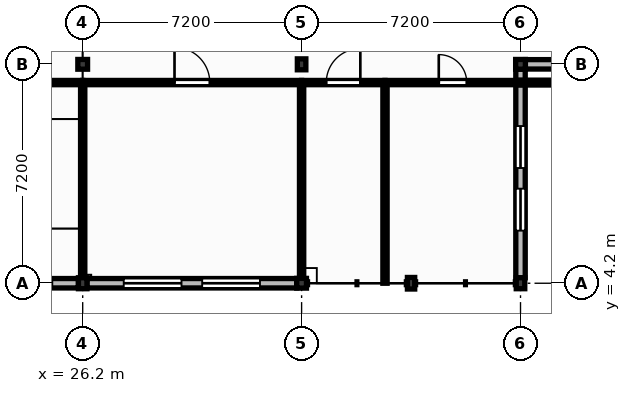
"""IFC4 building model, lengths in metres.
Left out: names, types, materials, properties, quantities, classifications, styles, units other than length and angle.
Written with IfcOpenShell. Run it as: python <this file> out.ifc"""

import sys

from ifc_helpers import new_model, si_unit, direction, frame, frame_2d, origin, origin_2d, place, context, subcontext, project, spatial, rectangle, extrude, element, fill, save


model = new_model("IFC4")
c1 = context("Model", 3, precision=1e-05, world=origin(), true_north=direction((0.0, 1.0)))
c2 = subcontext(c1, "Body", "Model", "MODEL_VIEW")
j1 = project(units=[si_unit("LENGTHUNIT", "METRE"), si_unit("PLANEANGLEUNIT", "RADIAN")], contexts=[c1])
p1 = place(None, origin())
s1 = spatial("IfcSite", under=j1, at=p1, CompositionType="ELEMENT")
p2 = place(p1, origin())
s2 = spatial("IfcBuilding", under=s1, at=p2, CompositionType="ELEMENT")
p3 = place(p2, frame((0.0, 0.0, 9.0)))
s3 = spatial("IfcBuildingStorey", under=s2, at=p3, CompositionType="ELEMENT", Elevation=9.0)
p4 = place(p3, frame((26.2, 4.2, 0.0), z_axis=(0.0, 0.0, 1.0), x_axis=(1.0, 0.0, 0.0)))
e1 = element("IfcColumn", 1, at=p4, inside=s3, PredefinedType="COLUMN", context=c2, shape_type="SweptSolid", body=[
    extrude(rectangle(XDim=0.28, YDim=0.36, at=origin_2d()), origin(), (0.0, 0.0, 1.0), 3.95),
])
for number, where, z_axis, x_axis in (
    (2, (26.2, 11.4, 0.0), (0.0, 0.0, 1.0), (1.0, 0.0, 0.0)),
    (3, (33.4, 4.2, 0.0), (0.0, 0.0, 1.0), (1.0, 0.0, 0.0)),
):
    element("IfcColumn", number, at=place(p3, frame(where, z_axis=z_axis, x_axis=x_axis)), inside=s3, PredefinedType="COLUMN", context=c2, shape_type="SweptSolid", body=[
        extrude(rectangle(XDim=0.32, YDim=0.32, at=origin_2d()), origin(), (0.0, 0.0, 1.0), 3.95),
    ])
for number, where, z_axis, x_axis in (
    (4, (33.4, 11.4, 0.0), (0.0, 0.0, 1.0), (1.0, 0.0, 0.0)),
    (5, (40.6, 4.2, 0.0), (0.0, 0.0, 1.0), (1.0, 0.0, 0.0)),
):
    element("IfcColumn", number, at=place(p3, frame(where, z_axis=z_axis, x_axis=x_axis)), inside=s3, PredefinedType="COLUMN", context=c2, shape_type="SweptSolid", body=[
        extrude(rectangle(XDim=0.28, YDim=0.36, at=origin_2d()), origin(), (0.0, 0.0, 1.0), 3.95),
    ])
p5 = place(p3, frame((40.6, 11.4, 0.0), z_axis=(0.0, 0.0, 1.0), x_axis=(1.0, 0.0, 0.0)))
e6 = element("IfcColumn", 6, at=p5, inside=s3, PredefinedType="COLUMN", context=c2, shape_type="SweptSolid", body=[
    extrude(rectangle(XDim=0.32, YDim=0.32, at=origin_2d()), origin(), (0.0, 0.0, 1.0), 3.95),
])
p6 = place(p3, frame((37.0, 4.2, 0.0), z_axis=(0.0, 0.0, 1.0), x_axis=(1.0, 0.0, 0.0)))
e7 = element("IfcColumn", 7, at=p6, inside=s3, PredefinedType="PILASTER", context=c2, shape_type="SweptSolid", body=[
    extrude(rectangle(XDim=0.24, YDim=0.38, at=origin_2d()), origin(), (0.0, 0.0, 1.0), 3.95),
])
p7 = place(p3, frame((22.72, 4.2, 0.0), z_axis=(0.0, 0.0, 1.0), x_axis=(1.0, 0.0, 0.0)))
e8 = element("IfcWall", 8, at=p7, inside=s3, PredefinedType="SOLIDWALL", context=c2, shape_type="SweptSolid", body=[
    extrude(rectangle(XDim=3.34, YDim=0.31, at=frame_2d((1.67, 0.0))), origin(), (0.0, 0.0, 1.0), 3.49),
])
p8 = place(p7, frame((0.86, 0.0, 1.0)))
e9 = element("IfcOpeningElement", 9, at=p8, cuts=e8, PredefinedType="OPENING", context=c2, shape_type="SweptSolid", body=[
    extrude(rectangle(XDim=1.62, YDim=1.95, at=frame_2d((0.81, 0.975))), frame((0.0, 0.165, 0.0), z_axis=(0.0, -1.0, 0.0), x_axis=(1.0, 0.0, 0.0)), (0.0, 0.0, 1.0), 0.33),
])
p9 = place(p3, frame((26.34, 4.2, 0.0), z_axis=(0.0, 0.0, 1.0), x_axis=(1.0, 0.0, 0.0)))
e10 = element("IfcWall", 10, at=p9, inside=s3, PredefinedType="SOLIDWALL", context=c2, shape_type="SweptSolid", body=[
    extrude(rectangle(XDim=6.9, YDim=0.31, at=frame_2d((3.45, 0.0))), origin(), (0.0, 0.0, 1.0), 3.49),
])
p10 = place(p9, frame((1.21, 0.0, 1.0)))
e11 = element("IfcOpeningElement", 11, at=p10, cuts=e10, PredefinedType="OPENING", context=c2, shape_type="SweptSolid", body=[
    extrude(rectangle(XDim=1.9, YDim=1.95, at=frame_2d((0.95, 0.975))), frame((0.0, 0.165, 0.0), z_axis=(0.0, -1.0, 0.0), x_axis=(1.0, 0.0, 0.0)), (0.0, 0.0, 1.0), 0.33),
])
p11 = place(p9, frame((3.79, 0.0, 1.0)))
e12 = element("IfcOpeningElement", 12, at=p11, cuts=e10, PredefinedType="OPENING", context=c2, shape_type="SweptSolid", body=[
    extrude(rectangle(XDim=1.9, YDim=1.95, at=frame_2d((0.95, 0.975))), frame((0.0, 0.165, 0.0), z_axis=(0.0, -1.0, 0.0), x_axis=(1.0, 0.0, 0.0)), (0.0, 0.0, 1.0), 0.33),
])
p12 = place(p3, frame((40.6, 4.38, 0.0), z_axis=(0.0, 0.0, 1.0), x_axis=(0.0, 1.0, 0.0)))
e13 = element("IfcWall", 13, at=p12, inside=s3, PredefinedType="SOLIDWALL", context=c2, shape_type="SweptSolid", body=[
    extrude(rectangle(XDim=6.86, YDim=0.31, at=frame_2d((3.43, 0.0))), origin(), (0.0, 0.0, 1.0), 3.49),
])
p13 = place(p12, frame((1.55, 0.0, 1.0)))
e14 = element("IfcOpeningElement", 14, at=p13, cuts=e13, PredefinedType="OPENING", context=c2, shape_type="SweptSolid", body=[
    extrude(rectangle(XDim=1.38, YDim=1.8, at=frame_2d((0.69, 0.9))), frame((0.0, 0.165, 0.0), z_axis=(0.0, -1.0, 0.0), x_axis=(1.0, 0.0, 0.0)), (0.0, 0.0, 1.0), 0.33),
])
p14 = place(p12, frame((3.61, 0.0, 1.0)))
e15 = element("IfcOpeningElement", 15, at=p14, cuts=e13, PredefinedType="OPENING", context=c2, shape_type="SweptSolid", body=[
    extrude(rectangle(XDim=1.38, YDim=1.8, at=frame_2d((0.69, 0.9))), frame((0.0, 0.165, 0.0), z_axis=(0.0, -1.0, 0.0), x_axis=(1.0, 0.0, 0.0)), (0.0, 0.0, 1.0), 0.33),
])
p15 = place(p3, frame((40.76, 11.4, 0.0), z_axis=(0.0, 0.0, 1.0), x_axis=(1.0, 0.0, 0.0)))
e16 = element("IfcWall", 16, at=p15, inside=s3, PredefinedType="SOLIDWALL", context=c2, shape_type="SweptSolid", body=[
    extrude(rectangle(XDim=6.9, YDim=0.31, at=frame_2d((3.45, 0.0))), origin(), (0.0, 0.0, 1.0), 3.49),
])
p16 = place(p15, frame((1.45, 0.0, 1.0)))
e17 = element("IfcOpeningElement", 17, at=p16, cuts=e16, PredefinedType="OPENING", context=c2, shape_type="SweptSolid", body=[
    extrude(rectangle(XDim=1.66, YDim=1.8, at=frame_2d((0.83, 0.9))), frame((0.0, 0.165, 0.0), z_axis=(0.0, -1.0, 0.0), x_axis=(1.0, 0.0, 0.0)), (0.0, 0.0, 1.0), 0.33),
])
p17 = place(p15, frame((3.79, 0.0, 1.0)))
e18 = element("IfcOpeningElement", 18, at=p17, cuts=e16, PredefinedType="OPENING", context=c2, shape_type="SweptSolid", body=[
    extrude(rectangle(XDim=1.66, YDim=1.8, at=frame_2d((0.83, 0.9))), frame((0.0, 0.165, 0.0), z_axis=(0.0, -1.0, 0.0), x_axis=(1.0, 0.0, 0.0)), (0.0, 0.0, 1.0), 0.33),
])
p18 = place(p3, frame((22.11, 10.8, 0.0), z_axis=(0.0, 0.0, 1.0), x_axis=(1.0, 0.0, 0.0)))
e19 = element("IfcWall", 19, at=p18, inside=s3, PredefinedType="PARTITIONING", context=c2, shape_type="SweptSolid", body=[
    extrude(rectangle(XDim=4.09, YDim=0.14, at=frame_2d((2.045, 0.0))), origin(), (0.0, 0.0, 1.0), 3.91),
])
p19 = place(p18, frame((1.485, 0.0, 0.0)))
e20 = element("IfcOpeningElement", 20, at=p19, cuts=e19, PredefinedType="OPENING", context=c2, shape_type="SweptSolid", body=[
    extrude(rectangle(XDim=1.12, YDim=2.15, at=frame_2d((0.56, 1.075))), frame((0.0, 0.08, 0.0), z_axis=(0.0, -1.0, 0.0), x_axis=(1.0, 0.0, 0.0)), (0.0, 0.0, 1.0), 0.16),
])
p20 = place(p3, frame((26.2, 4.38, 0.0), z_axis=(0.0, 0.0, 1.0), x_axis=(0.0, 1.0, 0.0)))
e21 = element("IfcWall", 21, at=p20, inside=s3, PredefinedType="PARTITIONING", context=c2, shape_type="SweptSolid", body=[
    extrude(rectangle(XDim=6.35, YDim=0.14, at=frame_2d((3.175, 0.0))), origin(), (0.0, 0.0, 1.0), 3.49),
])
p21 = place(p3, frame((26.2, 10.8, 0.0), z_axis=(0.0, 0.0, 1.0), x_axis=(1.0, 0.0, 0.0)))
e22 = element("IfcWall", 22, at=p21, inside=s3, PredefinedType="PARTITIONING", context=c2, shape_type="SweptSolid", body=[
    extrude(rectangle(XDim=7.2, YDim=0.14, at=frame_2d((3.6, 0.0))), origin(), (0.0, 0.0, 1.0), 3.91),
])
p22 = place(p21, frame((3.02, 0.0, 0.0)))
e23 = element("IfcOpeningElement", 23, at=p22, cuts=e22, PredefinedType="OPENING", context=c2, shape_type="SweptSolid", body=[
    extrude(rectangle(XDim=1.16, YDim=2.1, at=frame_2d((0.58, 1.05))), frame((0.0, 0.08, 0.0), z_axis=(0.0, -1.0, 0.0), x_axis=(1.0, 0.0, 0.0)), (0.0, 0.0, 1.0), 0.16),
])
p23 = place(p3, frame((33.4, 4.36, 0.0), z_axis=(0.0, 0.0, 1.0), x_axis=(0.0, 1.0, 0.0)))
e24 = element("IfcWall", 24, at=p23, inside=s3, PredefinedType="PARTITIONING", context=c2, shape_type="SweptSolid", body=[
    extrude(rectangle(XDim=6.37, YDim=0.14, at=frame_2d((3.185, 0.0))), origin(), (0.0, 0.0, 1.0), 3.49),
])
p24 = place(p3, frame((33.4, 10.8, 0.0), z_axis=(0.0, 0.0, 1.0), x_axis=(1.0, 0.0, 0.0)))
e25 = element("IfcWall", 25, at=p24, inside=s3, PredefinedType="PARTITIONING", context=c2, shape_type="SweptSolid", body=[
    extrude(rectangle(XDim=2.743, YDim=0.14, at=frame_2d((1.372, 0.0))), origin(), (0.0, 0.0, 1.0), 3.91),
])
p25 = place(p24, frame((0.812, 0.0, 0.0)))
e26 = element("IfcOpeningElement", 26, at=p25, cuts=e25, PredefinedType="OPENING", context=c2, shape_type="SweptSolid", body=[
    extrude(rectangle(XDim=1.12, YDim=2.15, at=frame_2d((0.56, 1.075))), frame((0.0, 0.08, 0.0), z_axis=(0.0, -1.0, 0.0), x_axis=(1.0, 0.0, 0.0)), (0.0, 0.0, 1.0), 0.16),
])
p26 = place(p3, frame((36.143, 4.2, 0.0), z_axis=(0.0, 0.0, 1.0), x_axis=(0.0, 1.0, 0.0)))
e27 = element("IfcWall", 27, at=p26, inside=s3, PredefinedType="PARTITIONING", context=c2, shape_type="SweptSolid", body=[
    extrude(rectangle(XDim=6.53, YDim=0.14, at=frame_2d((3.265, 0.0))), origin(), (0.0, 0.0, 1.0), 3.91),
])
p27 = place(p3, frame((36.143, 10.8, 0.0), z_axis=(0.0, 0.0, 1.0), x_axis=(1.0, 0.0, 0.0)))
e28 = element("IfcWall", 28, at=p27, inside=s3, PredefinedType="PARTITIONING", context=c2, shape_type="SweptSolid", body=[
    extrude(rectangle(XDim=4.457, YDim=0.14, at=frame_2d((2.229, 0.0))), origin(), (0.0, 0.0, 1.0), 3.91),
])
p28 = place(p27, frame((1.769, 0.0, 0.0)))
e29 = element("IfcOpeningElement", 29, at=p28, cuts=e28, PredefinedType="OPENING", context=c2, shape_type="SweptSolid", body=[
    extrude(rectangle(XDim=0.92, YDim=2.1, at=frame_2d((0.46, 1.05))), frame((0.0, 0.08, 0.0), z_axis=(0.0, -1.0, 0.0), x_axis=(1.0, 0.0, 0.0)), (0.0, 0.0, 1.0), 0.16),
])
p29 = place(p3, frame((40.6, 10.8, 0.0), z_axis=(0.0, 0.0, 1.0), x_axis=(1.0, 0.0, 0.0)))
e30 = element("IfcWall", 30, at=p29, inside=s3, PredefinedType="PARTITIONING", context=c2, shape_type="SweptSolid", body=[
    extrude(rectangle(XDim=7.2, YDim=0.16, at=frame_2d((3.6, 0.0))), origin(), (0.0, 0.0, 1.0), 3.96),
])
p30 = place(p8, origin())
e31 = element("IfcWindow", 31, at=p30, inside=s3, PartitioningType="DOUBLE_PANEL_VERTICAL", PredefinedType="WINDOW", context=c2, shape_type="SweptSolid", body=[
    extrude(rectangle(XDim=1.62, YDim=1.95, at=frame_2d((0.81, 0.975))), frame((0.0, 0.03, 0.0), z_axis=(0.0, -1.0, 0.0), x_axis=(1.0, 0.0, 0.0)), (0.0, 0.0, 1.0), 0.06),
])
fill(e9, e31)
p31 = place(p10, origin())
e32 = element("IfcWindow", 32, at=p31, inside=s3, PartitioningType="DOUBLE_PANEL_VERTICAL", PredefinedType="WINDOW", context=c2, shape_type="SweptSolid", body=[
    extrude(rectangle(XDim=1.9, YDim=1.95, at=frame_2d((0.95, 0.975))), frame((0.0, 0.03, 0.0), z_axis=(0.0, -1.0, 0.0), x_axis=(1.0, 0.0, 0.0)), (0.0, 0.0, 1.0), 0.06),
])
fill(e11, e32)
p32 = place(p11, origin())
e33 = element("IfcWindow", 33, at=p32, inside=s3, PartitioningType="DOUBLE_PANEL_VERTICAL", PredefinedType="WINDOW", context=c2, shape_type="SweptSolid", body=[
    extrude(rectangle(XDim=1.9, YDim=1.95, at=frame_2d((0.95, 0.975))), frame((0.0, 0.03, 0.0), z_axis=(0.0, -1.0, 0.0), x_axis=(1.0, 0.0, 0.0)), (0.0, 0.0, 1.0), 0.06),
])
fill(e12, e33)
p33 = place(p13, origin())
e34 = element("IfcWindow", 34, at=p33, inside=s3, PartitioningType="SINGLE_PANEL", PredefinedType="WINDOW", context=c2, shape_type="SweptSolid", body=[
    extrude(rectangle(XDim=1.38, YDim=1.8, at=frame_2d((0.69, 0.9))), frame((0.0, 0.03, 0.0), z_axis=(0.0, -1.0, 0.0), x_axis=(1.0, 0.0, 0.0)), (0.0, 0.0, 1.0), 0.06),
])
fill(e14, e34)
p34 = place(p14, origin())
e35 = element("IfcWindow", 35, at=p34, inside=s3, PartitioningType="SINGLE_PANEL", PredefinedType="WINDOW", context=c2, shape_type="SweptSolid", body=[
    extrude(rectangle(XDim=1.38, YDim=1.8, at=frame_2d((0.69, 0.9))), frame((0.0, 0.03, 0.0), z_axis=(0.0, -1.0, 0.0), x_axis=(1.0, 0.0, 0.0)), (0.0, 0.0, 1.0), 0.06),
])
fill(e15, e35)
p35 = place(p22, origin())
e36 = element("IfcDoor", 36, at=p35, inside=s3, OperationType="SINGLE_SWING_LEFT", PredefinedType="DOOR", context=c2, shape_type="SweptSolid", body=[
    extrude(rectangle(XDim=1.16, YDim=2.1, at=frame_2d((0.58, 1.05))), frame((0.0, 0.025, 0.0), z_axis=(0.0, -1.0, 0.0), x_axis=(1.0, 0.0, 0.0)), (0.0, 0.0, 1.0), 0.05),
])
fill(e23, e36)
p36 = place(p25, origin())
e37 = element("IfcDoor", 37, at=p36, inside=s3, OperationType="SINGLE_SWING_RIGHT", PredefinedType="DOOR", context=c2, shape_type="SweptSolid", body=[
    extrude(rectangle(XDim=1.12, YDim=2.15, at=frame_2d((0.56, 1.075))), frame((0.0, 0.025, 0.0), z_axis=(0.0, -1.0, 0.0), x_axis=(1.0, 0.0, 0.0)), (0.0, 0.0, 1.0), 0.05),
])
fill(e26, e37)
p37 = place(p28, origin())
e38 = element("IfcDoor", 38, at=p37, inside=s3, OperationType="SINGLE_SWING_LEFT", PredefinedType="DOOR", context=c2, shape_type="SweptSolid", body=[
    extrude(rectangle(XDim=0.92, YDim=2.1, at=frame_2d((0.46, 1.05))), frame((0.0, 0.025, 0.0), z_axis=(0.0, -1.0, 0.0), x_axis=(1.0, 0.0, 0.0)), (0.0, 0.0, 1.0), 0.05),
])
fill(e29, e38)
save(model, sys.argv[1])
